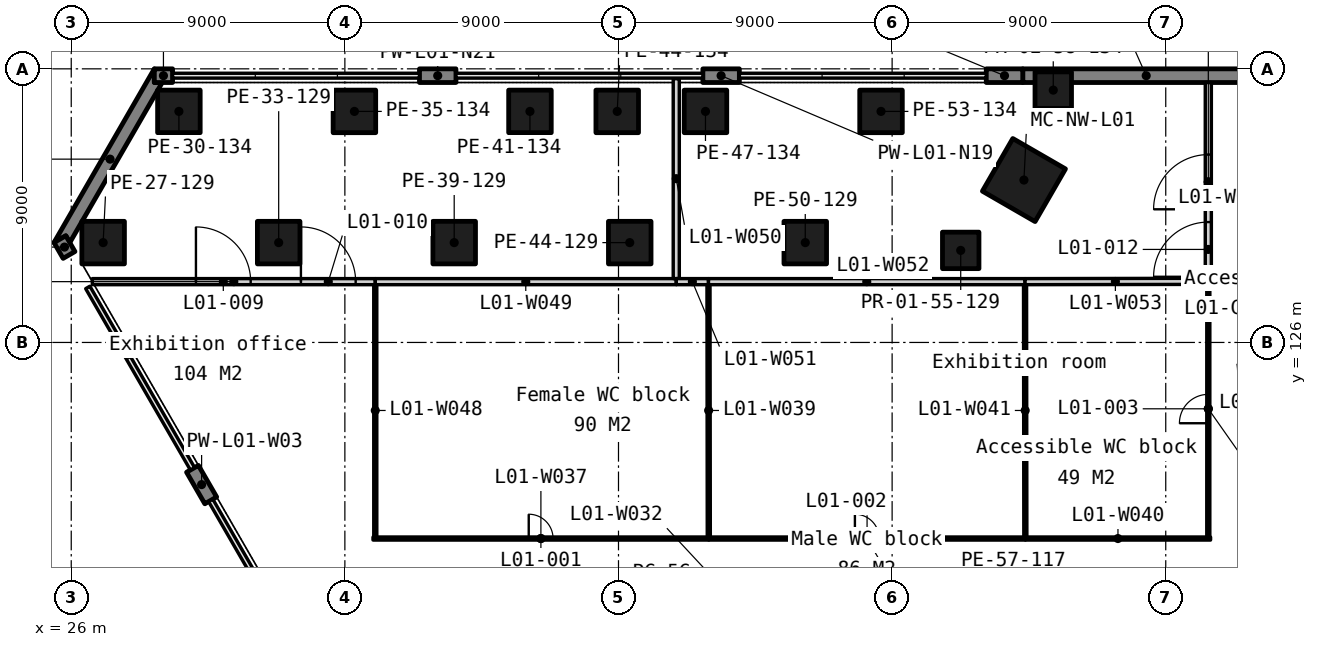
"""IFC4 building model, lengths in metres.
Left out: names, types, materials, properties, quantities, classifications, styles, units other than length and angle.
Written with IfcOpenShell. Run it as: python <this file> out.ifc"""

import sys

from ifc_helpers import new_model, si_unit, direction, frame, frame_2d, origin, origin_2d, place, context, subcontext, project, spatial, polyline, rectangle, outline, extrude, element, fill, save


model = new_model("IFC4")
c1 = context("Model", 3, precision=1e-05, world=origin(), true_north=direction((0.0, 1.0)))
c2 = subcontext(c1, "Body", "Model", "MODEL_VIEW")
j1 = project(units=[si_unit("LENGTHUNIT", "METRE"), si_unit("PLANEANGLEUNIT", "RADIAN")], contexts=[c1])
p1 = place(None, origin())
s1 = spatial("IfcSite", under=j1, at=p1, CompositionType="ELEMENT")
p2 = place(p1, origin())
s2 = spatial("IfcBuilding", under=s1, at=p2, CompositionType="ELEMENT")
p3 = place(p2, frame((0.0, 0.0, 7.5)))
s3 = spatial("IfcBuildingStorey", under=s2, at=p3, CompositionType="ELEMENT", Elevation=7.5)
for number, where, z_axis, x_axis in (
    (1, (27.049, 129.284, 0.0), (0.0, 0.0, 1.0), (1.0, 0.0, 0.0)),
    (2, (29.541, 133.6, 0.0), (0.0, 0.0, 1.0), (1.0, 0.0, 0.0)),
    (3, (32.823, 129.284, 0.0), (0.0, 0.0, 1.0), (1.0, 0.0, 0.0)),
    (4, (35.314, 133.6, 0.0), (0.0, 0.0, 1.0), (1.0, 0.0, 0.0)),
    (5, (38.596, 129.284, 0.0), (0.0, 0.0, 1.0), (1.0, 0.0, 0.0)),
    (6, (41.088, 133.6, 0.0), (0.0, 0.0, 1.0), (1.0, 0.0, 0.0)),
    (7, (44.37, 129.284, 0.0), (0.0, 0.0, 1.0), (1.0, 0.0, 0.0)),
    (8, (43.958, 133.6, 0.0), (0.0, 0.0, 1.0), (1.0, 0.0, 0.0)),
    (9, (46.861, 133.6, 0.0), (0.0, 0.0, 1.0), (1.0, 0.0, 0.0)),
    (10, (50.143, 129.284, 0.0), (0.0, 0.0, 1.0), (1.0, 0.0, 0.0)),
    (11, (52.635, 133.6, 0.0), (0.0, 0.0, 1.0), (1.0, 0.0, 0.0)),
):
    element("IfcColumn", number, at=place(p3, frame(where, z_axis=z_axis, x_axis=x_axis)), inside=s3, PredefinedType="COLUMN", context=c2, shape_type="SweptSolid", body=[
        extrude(rectangle(XDim=1.4, YDim=1.4, at=origin_2d()), origin(), (0.0, 0.0, 1.0), 6.0),
    ])
for number, where, z_axis, x_axis in (
    (12, (55.256, 129.028, 0.0), (0.0, 0.0, 1.0), (1.0, 0.0, 0.0)),
    (13, (58.3, 134.3, 0.0), (0.0, 0.0, 1.0), (1.0, 0.0, 0.0)),
):
    element("IfcColumn", number, at=place(p3, frame(where, z_axis=z_axis, x_axis=x_axis)), inside=s3, PredefinedType="COLUMN", context=c2, shape_type="SweptSolid", body=[
        extrude(rectangle(XDim=1.2, YDim=1.2, at=origin_2d()), origin(), (0.0, 0.0, 1.0), 6.0),
    ])
p4 = place(p3, frame((57.336, 131.342, 0.0), z_axis=(0.0, 0.0, 1.0), x_axis=(-0.5, -0.866025403784, 0.0)))
e14 = element("IfcColumn", 14, at=p4, inside=s3, PredefinedType="COLUMN", context=c2, shape_type="SweptSolid", body=[
    extrude(rectangle(XDim=2.0, YDim=2.0, at=origin_2d()), origin(), (0.0, 0.0, 1.0), 6.0),
])
p5 = place(p3, frame((0.0, 0.0, -0.3)))
e15 = element("IfcWall", 15, at=p5, inside=s3, PredefinedType="SOLIDWALL", context=c2, shape_type="SweptSolid", body=[
    extrude(outline(polyline([(28.732, 135.0), (28.732, 134.55), (28.992, 134.55), (25.952, 129.284), (25.822, 129.509), (25.432, 129.284), (28.732, 135.0)])), origin(), (0.0, 0.0, 1.0), 5.312),
])
p6 = place(p3, frame((65.418, 134.775, -0.3), z_axis=(0.0, 0.0, 1.0), x_axis=(-1.0, 0.0, 0.0)))
e16 = element("IfcWall", 16, at=p6, inside=s3, PredefinedType="SOLIDWALL", context=c2, shape_type="SweptSolid", body=[
    extrude(rectangle(XDim=8.121, YDim=0.45, at=frame_2d((4.061, 0.0))), origin(), (0.0, 0.0, 1.0), 5.312),
])
for number, where, z_axis, x_axis in (
    (17, (57.297, 134.775, -0.3), (0.0, 0.0, 1.0), (-1.0, 0.0, 0.0)),
    (18, (47.975, 134.775, -0.3), (0.0, 0.0, 1.0), (-1.0, 0.0, 0.0)),
    (19, (38.654, 134.775, -0.3), (0.0, 0.0, 1.0), (-1.0, 0.0, 0.0)),
):
    element("IfcWall", number, at=place(p3, frame(where, z_axis=z_axis, x_axis=x_axis)), inside=s3, PredefinedType="SOLIDWALL", context=c2, shape_type="SweptSolid", body=[
        extrude(rectangle(XDim=1.2, YDim=0.45, at=frame_2d((0.6, 0.0))), origin(), (0.0, 0.0, 1.0), 5.312),
    ])
p7 = place(p3, frame((29.333, 134.775, -0.3), z_axis=(0.0, 0.0, 1.0), x_axis=(-1.0, 0.0, 0.0)))
e20 = element("IfcWall", 20, at=p7, inside=s3, PredefinedType="SOLIDWALL", context=c2, shape_type="SweptSolid", body=[
    extrude(rectangle(XDim=0.6, YDim=0.45, at=frame_2d((0.3, 0.0))), origin(), (0.0, 0.0, 1.0), 5.312),
])
p8 = place(p3, frame((25.627, 129.397, -0.3), z_axis=(0.0, 0.0, 1.0), x_axis=(0.499816412211, -0.866131372301, 0.0)))
e21 = element("IfcWall", 21, at=p8, inside=s3, PredefinedType="SOLIDWALL", context=c2, shape_type="SweptSolid", body=[
    extrude(rectangle(XDim=0.6, YDim=0.45, at=frame_2d((0.3, 0.0))), origin(), (0.0, 0.0, 1.0), 5.312),
])
p9 = place(p3, frame((29.988, 121.844, -0.3), z_axis=(0.0, 0.0, 1.0), x_axis=(0.50012165622, -0.865955154139, 0.0)))
e22 = element("IfcWall", 22, at=p9, inside=s3, PredefinedType="SOLIDWALL", context=c2, shape_type="SweptSolid", body=[
    extrude(rectangle(XDim=1.2, YDim=0.45, at=frame_2d((0.6, 0.0))), origin(), (0.0, 0.0, 1.0), 5.312),
])
p10 = place(p3, frame((35.926, 119.55, 0.0), z_axis=(0.0, 0.0, 1.0), x_axis=(1.0, 0.0, 0.0)))
e23 = element("IfcWall", 23, at=p10, inside=s3, PredefinedType="PARTITIONING", context=c2, shape_type="SweptSolid", body=[
    extrude(rectangle(XDim=11.044, YDim=0.1, at=frame_2d((5.522, 0.0))), origin(), (0.0, 0.0, 1.0), 5.7),
])
p11 = place(p10, frame((5.122, 0.0, 0.0)))
e24 = element("IfcOpeningElement", 24, at=p11, cuts=e23, PredefinedType="OPENING", context=c2, shape_type="SweptSolid", body=[
    extrude(rectangle(XDim=0.8, YDim=2.1, at=frame_2d((0.4, 1.05))), frame((0.0, 0.06, 0.0), z_axis=(0.0, -1.0, 0.0), x_axis=(1.0, 0.0, 0.0)), (0.0, 0.0, 1.0), 0.12),
])
p12 = place(p3, frame((46.97, 119.55, 0.0), z_axis=(0.0, 0.0, 1.0), x_axis=(1.0, 0.0, 0.0)))
e25 = element("IfcWall", 25, at=p12, inside=s3, PredefinedType="PARTITIONING", context=c2, shape_type="SweptSolid", body=[
    extrude(rectangle(XDim=10.412, YDim=0.1, at=frame_2d((5.206, 0.0))), origin(), (0.0, 0.0, 1.0), 5.7),
])
p13 = place(p12, frame((4.806, 0.0, 0.0)))
e26 = element("IfcOpeningElement", 26, at=p13, cuts=e25, PredefinedType="OPENING", context=c2, shape_type="SweptSolid", body=[
    extrude(rectangle(XDim=0.8, YDim=2.1, at=frame_2d((0.4, 1.05))), frame((0.0, 0.06, 0.0), z_axis=(0.0, -1.0, 0.0), x_axis=(1.0, 0.0, 0.0)), (0.0, 0.0, 1.0), 0.12),
])
p14 = place(p3, frame((46.97, 119.625, 0.0), z_axis=(0.0, 0.0, 1.0), x_axis=(-0.001180149057, 0.999999303624, 0.0)))
e27 = element("IfcWall", 27, at=p14, inside=s3, PredefinedType="PARTITIONING", context=c2, shape_type="SweptSolid", body=[
    extrude(rectangle(XDim=8.275, YDim=0.1, at=frame_2d((4.137, 0.0))), origin(), (0.0, 0.0, 1.0), 5.7),
])
p15 = place(p3, frame((57.382, 119.55, 0.0), z_axis=(0.0, 0.0, 1.0), x_axis=(1.0, 0.0, 0.0)))
e28 = element("IfcWall", 28, at=p15, inside=s3, PredefinedType="PARTITIONING", context=c2, shape_type="SweptSolid", body=[
    extrude(rectangle(XDim=6.092, YDim=0.1, at=frame_2d((3.046, 0.0))), origin(), (0.0, 0.0, 1.0), 5.7),
])
p16 = place(p3, frame((57.382, 119.625, 0.0), z_axis=(0.0, 0.0, 1.0), x_axis=(-0.001180149057, 0.999999303624, 0.0)))
e29 = element("IfcWall", 29, at=p16, inside=s3, PredefinedType="PARTITIONING", context=c2, shape_type="SweptSolid", body=[
    extrude(rectangle(XDim=8.275, YDim=0.1, at=frame_2d((4.137, 0.0))), origin(), (0.0, 0.0, 1.0), 5.7),
])
p17 = place(p3, frame((63.399, 119.625, 0.0), z_axis=(0.0, 0.0, 1.0), x_axis=(5.8232639e-05, 0.999999998304, 0.0)))
e30 = element("IfcWall", 30, at=p17, inside=s3, PredefinedType="PARTITIONING", context=c2, shape_type="SweptSolid", body=[
    extrude(rectangle(XDim=8.385, YDim=0.1, at=frame_2d((4.192, 0.0))), origin(), (0.0, 0.0, 1.0), 5.7),
])
p18 = place(p17, frame((3.718, 0.0, 0.0)))
e31 = element("IfcOpeningElement", 31, at=p18, cuts=e30, PredefinedType="OPENING", context=c2, shape_type="SweptSolid", body=[
    extrude(rectangle(XDim=0.95, YDim=2.1, at=frame_2d((0.475, 1.05))), frame((0.0, 0.06, 0.0), z_axis=(0.0, -1.0, 0.0), x_axis=(1.0, 0.0, 0.0)), (0.0, 0.0, 1.0), 0.12),
])
p19 = place(p3, frame((63.4, 128.01, 0.0), z_axis=(0.0, 0.0, 1.0), x_axis=(0.0, 1.0, 0.0)))
e32 = element("IfcWall", 32, at=p19, inside=s3, PredefinedType="PARTITIONING", context=c2, shape_type="SweptSolid", body=[
    extrude(rectangle(XDim=6.54, YDim=0.2, at=frame_2d((3.27, 0.0))), origin(), (0.0, 0.0, 1.0), 5.7),
])
p20 = place(p19, frame((2.37, 0.0, 0.0)))
e33 = element("IfcOpeningElement", 33, at=p20, cuts=e32, PredefinedType="OPENING", context=c2, shape_type="SweptSolid", body=[
    extrude(rectangle(XDim=1.8, YDim=2.1, at=frame_2d((0.9, 1.05))), frame((0.0, 0.11, 0.0), z_axis=(0.0, -1.0, 0.0), x_axis=(1.0, 0.0, 0.0)), (0.0, 0.0, 1.0), 0.22),
])
p21 = place(p19, frame((0.15, 0.0, 0.0)))
e34 = element("IfcOpeningElement", 34, at=p21, cuts=e32, PredefinedType="OPENING", context=c2, shape_type="SweptSolid", body=[
    extrude(rectangle(XDim=1.8, YDim=2.1, at=frame_2d((0.9, 1.05))), frame((0.0, 0.11, 0.0), z_axis=(0.0, -1.0, 0.0), x_axis=(1.0, 0.0, 0.0)), (0.0, 0.0, 1.0), 0.22),
])
p22 = place(p3, frame((26.694, 128.0, 0.0), z_axis=(0.0, 0.0, 1.0), x_axis=(1.0, 0.0, 0.0)))
e35 = element("IfcWall", 35, at=p22, inside=s3, PredefinedType="PARTITIONING", context=c2, shape_type="SweptSolid", body=[
    extrude(rectangle(XDim=9.306, YDim=0.2, at=frame_2d((4.653, 0.0))), origin(), (0.0, 0.0, 1.0), 5.7),
])
p23 = place(p22, frame((3.408, 0.0, 0.0)))
e36 = element("IfcOpeningElement", 36, at=p23, cuts=e35, PredefinedType="OPENING", context=c2, shape_type="SweptSolid", body=[
    extrude(rectangle(XDim=1.8, YDim=2.1, at=frame_2d((0.9, 1.05))), frame((0.0, 0.11, 0.0), z_axis=(0.0, -1.0, 0.0), x_axis=(1.0, 0.0, 0.0)), (0.0, 0.0, 1.0), 0.22),
])
p24 = place(p22, frame((6.861, 0.0, 0.0)))
e37 = element("IfcOpeningElement", 37, at=p24, cuts=e35, PredefinedType="OPENING", context=c2, shape_type="SweptSolid", body=[
    extrude(rectangle(XDim=1.8, YDim=2.1, at=frame_2d((0.9, 1.05))), frame((0.0, 0.11, 0.0), z_axis=(0.0, -1.0, 0.0), x_axis=(1.0, 0.0, 0.0)), (0.0, 0.0, 1.0), 0.22),
])
p25 = place(p3, frame((36.0, 119.625, 0.0), z_axis=(0.0, 0.0, 1.0), x_axis=(-5.9007494e-05, 0.999999998259, 0.0)))
e38 = element("IfcWall", 38, at=p25, inside=s3, PredefinedType="PARTITIONING", context=c2, shape_type="SweptSolid", body=[
    extrude(rectangle(XDim=8.275, YDim=0.1, at=frame_2d((4.137, 0.0))), origin(), (0.0, 0.0, 1.0), 5.7),
])
p26 = place(p3, frame((36.0, 128.0, 0.0), z_axis=(0.0, 0.0, 1.0), x_axis=(1.0, 0.0, 0.0)))
e39 = element("IfcWall", 39, at=p26, inside=s3, PredefinedType="PARTITIONING", context=c2, shape_type="SweptSolid", body=[
    extrude(rectangle(XDim=9.9, YDim=0.2, at=frame_2d((4.95, 0.0))), origin(), (0.0, 0.0, 1.0), 5.7),
])
p27 = place(p3, frame((45.9, 128.1, 0.0), z_axis=(0.0, 0.0, 1.0), x_axis=(0.0, 1.0, 0.0)))
e40 = element("IfcWall", 40, at=p27, inside=s3, PredefinedType="PARTITIONING", context=c2, shape_type="SweptSolid", body=[
    extrude(rectangle(XDim=6.575, YDim=0.2, at=frame_2d((3.288, 0.0))), origin(), (0.0, 0.0, 1.0), 5.7),
])
p28 = place(p3, frame((45.9, 128.0, 0.0), z_axis=(0.0, 0.0, 1.0), x_axis=(1.0, 0.0, 0.0)))
e41 = element("IfcWall", 41, at=p28, inside=s3, PredefinedType="PARTITIONING", context=c2, shape_type="SweptSolid", body=[
    extrude(rectangle(XDim=1.06, YDim=0.2, at=frame_2d((0.53, 0.0))), origin(), (0.0, 0.0, 1.0), 5.7),
])
p29 = place(p3, frame((46.96, 128.0, 0.0), z_axis=(0.0, 0.0, 1.0), x_axis=(1.0, 0.0, 0.0)))
e42 = element("IfcWall", 42, at=p29, inside=s3, PredefinedType="PARTITIONING", context=c2, shape_type="SweptSolid", body=[
    extrude(rectangle(XDim=10.412, YDim=0.2, at=frame_2d((5.206, 0.0))), origin(), (0.0, 0.0, 1.0), 5.7),
])
p30 = place(p3, frame((57.372, 128.0, 0.0), z_axis=(0.0, 0.0, 1.0), x_axis=(0.999998649867, 0.001643248131, 0.0)))
e43 = element("IfcWall", 43, at=p30, inside=s3, PredefinedType="PARTITIONING", context=c2, shape_type="SweptSolid", body=[
    extrude(rectangle(XDim=5.943, YDim=0.2, at=frame_2d((2.971, 0.0))), origin(), (0.0, 0.0, 1.0), 5.7),
])
p31 = place(p11, origin())
e44 = element("IfcDoor", 44, at=p31, inside=s3, OperationType="SINGLE_SWING_LEFT", PredefinedType="DOOR", context=c2, shape_type="SweptSolid", body=[
    extrude(rectangle(XDim=0.8, YDim=2.1, at=frame_2d((0.4, 1.05))), frame((0.0, 0.025, 0.0), z_axis=(0.0, -1.0, 0.0), x_axis=(1.0, 0.0, 0.0)), (0.0, 0.0, 1.0), 0.05),
])
fill(e24, e44)
p32 = place(p13, origin())
e45 = element("IfcDoor", 45, at=p32, inside=s3, OperationType="SINGLE_SWING_LEFT", PredefinedType="DOOR", context=c2, shape_type="SweptSolid", body=[
    extrude(rectangle(XDim=0.8, YDim=2.1, at=frame_2d((0.4, 1.05))), frame((0.0, 0.025, 0.0), z_axis=(0.0, -1.0, 0.0), x_axis=(1.0, 0.0, 0.0)), (0.0, 0.0, 1.0), 0.05),
])
fill(e26, e45)
p33 = place(p18, origin())
e46 = element("IfcDoor", 46, at=p33, inside=s3, OperationType="SINGLE_SWING_LEFT", PredefinedType="DOOR", context=c2, shape_type="SweptSolid", body=[
    extrude(rectangle(XDim=0.95, YDim=2.1, at=frame_2d((0.475, 1.05))), frame((0.0, 0.025, 0.0), z_axis=(0.0, -1.0, 0.0), x_axis=(1.0, 0.0, 0.0)), (0.0, 0.0, 1.0), 0.05),
])
fill(e31, e46)
p34 = place(p23, origin())
e47 = element("IfcDoor", 47, at=p34, inside=s3, OperationType="SINGLE_SWING_LEFT", PredefinedType="DOOR", context=c2, shape_type="SweptSolid", body=[
    extrude(rectangle(XDim=1.8, YDim=2.1, at=frame_2d((0.9, 1.05))), frame((0.0, 0.025, 0.0), z_axis=(0.0, -1.0, 0.0), x_axis=(1.0, 0.0, 0.0)), (0.0, 0.0, 1.0), 0.05),
])
fill(e36, e47)
p35 = place(p24, origin())
e48 = element("IfcDoor", 48, at=p35, inside=s3, OperationType="SINGLE_SWING_LEFT", PredefinedType="DOOR", context=c2, shape_type="SweptSolid", body=[
    extrude(rectangle(XDim=1.8, YDim=2.1, at=frame_2d((0.9, 1.05))), frame((0.0, 0.025, 0.0), z_axis=(0.0, -1.0, 0.0), x_axis=(1.0, 0.0, 0.0)), (0.0, 0.0, 1.0), 0.05),
])
fill(e37, e48)
p36 = place(p20, origin())
e49 = element("IfcDoor", 49, at=p36, inside=s3, OperationType="SINGLE_SWING_LEFT", PredefinedType="DOOR", context=c2, shape_type="SweptSolid", body=[
    extrude(rectangle(XDim=1.8, YDim=2.1, at=frame_2d((0.9, 1.05))), frame((0.0, 0.025, 0.0), z_axis=(0.0, -1.0, 0.0), x_axis=(1.0, 0.0, 0.0)), (0.0, 0.0, 1.0), 0.05),
])
fill(e33, e49)
p37 = place(p21, origin())
e50 = element("IfcDoor", 50, at=p37, inside=s3, OperationType="SINGLE_SWING_LEFT", PredefinedType="DOOR", context=c2, shape_type="SweptSolid", body=[
    extrude(rectangle(XDim=1.8, YDim=2.1, at=frame_2d((0.9, 1.05))), frame((0.0, 0.025, 0.0), z_axis=(0.0, -1.0, 0.0), x_axis=(1.0, 0.0, 0.0)), (0.0, 0.0, 1.0), 0.05),
])
fill(e34, e50)
save(model, sys.argv[1])
